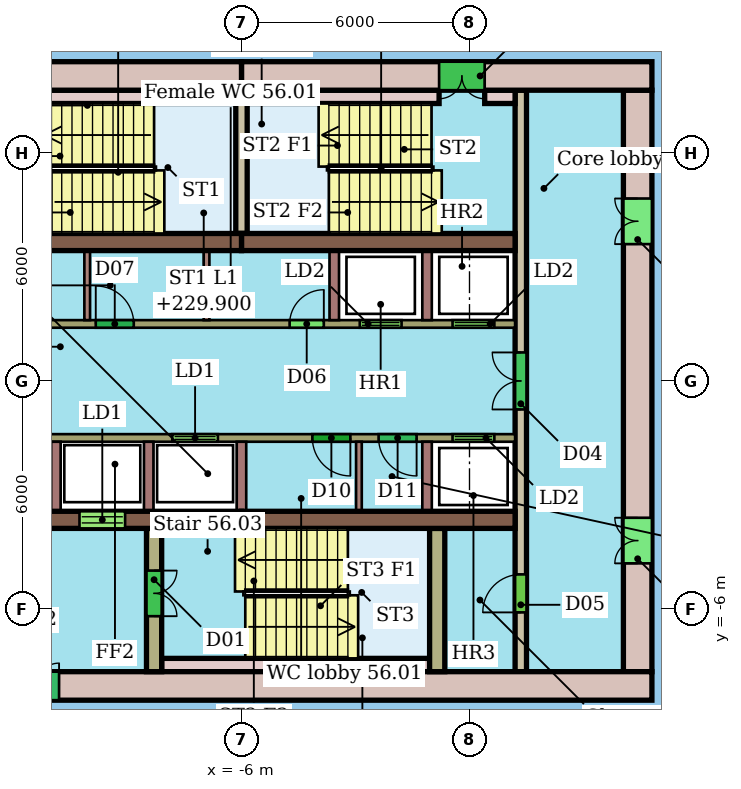
"""IFC4 building model, lengths in metres.
Left out: names, types, materials, properties, quantities, classifications, styles, units other than length and angle.
Written with IfcOpenShell. Run it as: python <this file> out.ifc"""

import sys

from ifc_helpers import new_model, si_unit, direction, frame, frame_2d, origin, place, context, subcontext, project, spatial, rectangle, extrude, element, fill, save


model = new_model("IFC4")
c1 = context("Model", 3, precision=1e-05, world=origin(), true_north=direction((0.0, 1.0)))
c2 = subcontext(c1, "Body", "Model", "MODEL_VIEW")
j1 = project(units=[si_unit("LENGTHUNIT", "METRE"), si_unit("PLANEANGLEUNIT", "RADIAN")], contexts=[c1])
p1 = place(None, origin())
s1 = spatial("IfcSite", under=j1, at=p1, CompositionType="ELEMENT")
p2 = place(p1, origin())
s2 = spatial("IfcBuilding", under=s1, at=p2, CompositionType="ELEMENT")
p3 = place(p2, frame((0.0, 0.0, 228.1)))
s3 = spatial("IfcBuildingStorey", under=s2, at=p3, CompositionType="ELEMENT", Elevation=228.1)
p4 = place(p3, frame((4.8, 8.025, 0.0), z_axis=(0.0, 0.0, 1.0), x_axis=(-1.0, 0.0, 0.0)))
e1 = element("IfcWall", 1, at=p4, inside=s3, PredefinedType="SHEAR", context=c2, shape_type="SweptSolid", body=[
    extrude(rectangle(XDim=10.8, YDim=0.75, at=frame_2d((5.4, 0.0))), origin(), (0.0, 0.0, 1.0), 3.3),
])
p5 = place(p4, frame((4.4, 0.0, 0.0)))
e2 = element("IfcOpeningElement", 2, at=p5, cuts=e1, PredefinedType="OPENING", context=c2, shape_type="SweptSolid", body=[
    extrude(rectangle(XDim=1.2, YDim=2.1, at=frame_2d((0.6, 1.05))), frame((0.0, 0.385, 0.0), z_axis=(0.0, -1.0, 0.0), x_axis=(1.0, 0.0, 0.0)), (0.0, 0.0, 1.0), 0.77),
])
p6 = place(p3, frame((-6.0, 8.025, 0.0), z_axis=(0.0, 0.0, 1.0), x_axis=(-1.0, 0.0, 0.0)))
e3 = element("IfcWall", 3, at=p6, inside=s3, PredefinedType="SHEAR", context=c2, shape_type="SweptSolid", body=[
    extrude(rectangle(XDim=10.8, YDim=0.75, at=frame_2d((5.4, 0.0))), origin(), (0.0, 0.0, 1.0), 3.3),
])
p7 = place(p6, frame((5.2, 0.0, 0.0)))
e4 = element("IfcOpeningElement", 4, at=p7, cuts=e3, PredefinedType="OPENING", context=c2, shape_type="SweptSolid", body=[
    extrude(rectangle(XDim=1.2, YDim=2.1, at=frame_2d((0.6, 1.05))), frame((0.0, 0.385, 0.0), z_axis=(0.0, -1.0, 0.0), x_axis=(1.0, 0.0, 0.0)), (0.0, 0.0, 1.0), 0.77),
])
p8 = place(p3, frame((-16.8, -8.025, 0.0), z_axis=(0.0, 0.0, 1.0), x_axis=(1.0, 0.0, 0.0)))
e5 = element("IfcWall", 5, at=p8, inside=s3, PredefinedType="SHEAR", context=c2, shape_type="SweptSolid", body=[
    extrude(rectangle(XDim=21.6, YDim=0.75, at=frame_2d((10.8, 0.0))), origin(), (0.0, 0.0, 1.0), 3.3),
])
p9 = place(p8, frame((4.8, 0.0, 0.0)))
e6 = element("IfcOpeningElement", 6, at=p9, cuts=e5, PredefinedType="OPENING", context=c2, shape_type="SweptSolid", body=[
    extrude(rectangle(XDim=1.2, YDim=2.1, at=frame_2d((0.6, 1.05))), frame((0.0, 0.385, 0.0), z_axis=(0.0, -1.0, 0.0), x_axis=(1.0, 0.0, 0.0)), (0.0, 0.0, 1.0), 0.77),
])
p10 = place(p3, frame((4.425, -7.65, 0.0), z_axis=(0.0, 0.0, 1.0), x_axis=(0.0, 1.0, 0.0)))
e7 = element("IfcWall", 7, at=p10, inside=s3, PredefinedType="SHEAR", context=c2, shape_type="SweptSolid", body=[
    extrude(rectangle(XDim=15.3, YDim=0.75, at=frame_2d((7.65, 0.0))), origin(), (0.0, 0.0, 1.0), 3.3),
])
p11 = place(p10, frame((2.85, 0.0, 0.0)))
e8 = element("IfcOpeningElement", 8, at=p11, cuts=e7, PredefinedType="OPENING", context=c2, shape_type="SweptSolid", body=[
    extrude(rectangle(XDim=1.2, YDim=2.1, at=frame_2d((0.6, 1.05))), frame((0.0, 0.385, 0.0), z_axis=(0.0, -1.0, 0.0), x_axis=(1.0, 0.0, 0.0)), (0.0, 0.0, 1.0), 0.77),
])
p12 = place(p10, frame((11.25, 0.0, 0.0)))
e9 = element("IfcOpeningElement", 9, at=p12, cuts=e7, PredefinedType="OPENING", context=c2, shape_type="SweptSolid", body=[
    extrude(rectangle(XDim=1.2, YDim=2.1, at=frame_2d((0.6, 1.05))), frame((0.0, 0.385, 0.0), z_axis=(0.0, -1.0, 0.0), x_axis=(1.0, 0.0, 0.0)), (0.0, 0.0, 1.0), 0.77),
])
for number, where, z_axis, x_axis in (
    (10, (-13.2, 3.655, 0.0), (0.0, 0.0, 1.0), (1.0, 0.0, 0.0)),
    (11, (-6.0, 3.655, 0.0), (0.0, 0.0, 1.0), (1.0, 0.0, 0.0)),
):
    element("IfcWall", number, at=place(p3, frame(where, z_axis=z_axis, x_axis=x_axis)), inside=s3, PredefinedType="SHEAR", context=c2, shape_type="SweptSolid", body=[
        extrude(rectangle(XDim=7.2, YDim=0.45, at=frame_2d((3.6, 0.0))), origin(), (0.0, 0.0, 1.0), 3.3),
    ])
p13 = place(p3, frame((-13.2, -3.655, 0.0), z_axis=(0.0, 0.0, 1.0), x_axis=(1.0, 0.0, 0.0)))
e12 = element("IfcWall", 12, at=p13, inside=s3, PredefinedType="SHEAR", context=c2, shape_type="SweptSolid", body=[
    extrude(rectangle(XDim=7.2, YDim=0.45, at=frame_2d((3.6, 0.0))), origin(), (0.0, 0.0, 1.0), 3.3),
])
p14 = place(p13, frame((0.496, 0.0, 0.0)))
e13 = element("IfcOpeningElement", 13, at=p14, cuts=e12, PredefinedType="OPENING", context=c2, shape_type="SweptSolid", body=[
    extrude(rectangle(XDim=1.2, YDim=2.1, at=frame_2d((0.6, 1.05))), frame((0.0, 0.235, 0.0), z_axis=(0.0, -1.0, 0.0), x_axis=(1.0, 0.0, 0.0)), (0.0, 0.0, 1.0), 0.47),
])
p15 = place(p13, frame((2.938, 0.0, 0.0)))
e14 = element("IfcOpeningElement", 14, at=p15, cuts=e12, PredefinedType="OPENING", context=c2, shape_type="SweptSolid", body=[
    extrude(rectangle(XDim=1.2, YDim=2.1, at=frame_2d((0.6, 1.05))), frame((0.0, 0.235, 0.0), z_axis=(0.0, -1.0, 0.0), x_axis=(1.0, 0.0, 0.0)), (0.0, 0.0, 1.0), 0.47),
])
p16 = place(p3, frame((-6.0, -3.655, 0.0), z_axis=(0.0, 0.0, 1.0), x_axis=(1.0, 0.0, 0.0)))
e15 = element("IfcWall", 15, at=p16, inside=s3, PredefinedType="SHEAR", context=c2, shape_type="SweptSolid", body=[
    extrude(rectangle(XDim=7.2, YDim=0.45, at=frame_2d((3.6, 0.0))), origin(), (0.0, 0.0, 1.0), 3.3),
])
p17 = place(p3, frame((1.35, -7.65, 0.0), z_axis=(0.0, 0.0, 1.0), x_axis=(0.0, 1.0, 0.0)))
e16 = element("IfcWall", 16, at=p17, inside=s3, PredefinedType="SHEAR", context=c2, shape_type="SweptSolid", body=[
    extrude(rectangle(XDim=15.3, YDim=0.3, at=frame_2d((7.65, 0.0))), origin(), (0.0, 0.0, 1.0), 3.3),
])
p18 = place(p17, frame((1.56, 0.0, 0.0)))
e17 = element("IfcOpeningElement", 17, at=p18, cuts=e16, PredefinedType="OPENING", context=c2, shape_type="SweptSolid", body=[
    extrude(rectangle(XDim=1.0, YDim=2.1, at=frame_2d((0.5, 1.05))), frame((0.0, 0.16, 0.0), z_axis=(0.0, -1.0, 0.0), x_axis=(1.0, 0.0, 0.0)), (0.0, 0.0, 1.0), 0.32),
])
p19 = place(p17, frame((6.9, 0.0, 0.0)))
e18 = element("IfcOpeningElement", 18, at=p19, cuts=e16, PredefinedType="OPENING", context=c2, shape_type="SweptSolid", body=[
    extrude(rectangle(XDim=1.5, YDim=2.1, at=frame_2d((0.75, 1.05))), frame((0.0, 0.16, 0.0), z_axis=(0.0, -1.0, 0.0), x_axis=(1.0, 0.0, 0.0)), (0.0, 0.0, 1.0), 0.32),
])
p20 = place(p3, frame((-13.2, 1.5, 0.0), z_axis=(0.0, 0.0, 1.0), x_axis=(1.0, 0.0, 0.0)))
e19 = element("IfcWall", 19, at=p20, inside=s3, PredefinedType="SHEAR", context=c2, shape_type="SweptSolid", body=[
    extrude(rectangle(XDim=14.4, YDim=0.2, at=frame_2d((7.2, 0.0))), origin(), (0.0, 0.0, 1.0), 3.3),
])
p21 = place(p20, frame((10.312, 0.0, 0.0)))
e20 = element("IfcOpeningElement", 20, at=p21, cuts=e19, PredefinedType="OPENING", context=c2, shape_type="SweptSolid", body=[
    extrude(rectangle(XDim=1.1, YDim=2.1, at=frame_2d((0.55, 1.05))), frame((0.0, 0.11, 0.0), z_axis=(0.0, -1.0, 0.0), x_axis=(1.0, 0.0, 0.0)), (0.0, 0.0, 1.0), 0.22),
])
p22 = place(p20, frame((12.754, 0.0, 0.0)))
e21 = element("IfcOpeningElement", 21, at=p22, cuts=e19, PredefinedType="OPENING", context=c2, shape_type="SweptSolid", body=[
    extrude(rectangle(XDim=1.1, YDim=2.1, at=frame_2d((0.55, 1.05))), frame((0.0, 0.11, 0.0), z_axis=(0.0, -1.0, 0.0), x_axis=(1.0, 0.0, 0.0)), (0.0, 0.0, 1.0), 0.22),
])
p23 = place(p20, frame((0.15, 0.0, 0.0)))
e22 = element("IfcOpeningElement", 22, at=p23, cuts=e19, PredefinedType="OPENING", context=c2, shape_type="SweptSolid", body=[
    extrude(rectangle(XDim=0.9, YDim=2.1, at=frame_2d((0.45, 1.05))), frame((0.0, 0.11, 0.0), z_axis=(0.0, -1.0, 0.0), x_axis=(1.0, 0.0, 0.0)), (0.0, 0.0, 1.0), 0.22),
])
p24 = place(p20, frame((3.365, 0.0, 0.0)))
e23 = element("IfcOpeningElement", 23, at=p24, cuts=e19, PredefinedType="OPENING", context=c2, shape_type="SweptSolid", body=[
    extrude(rectangle(XDim=1.0, YDim=2.1, at=frame_2d((0.5, 1.05))), frame((0.0, 0.11, 0.0), z_axis=(0.0, -1.0, 0.0), x_axis=(1.0, 0.0, 0.0)), (0.0, 0.0, 1.0), 0.22),
])
p25 = place(p20, frame((8.467, 0.0, 0.0)))
e24 = element("IfcOpeningElement", 24, at=p25, cuts=e19, PredefinedType="OPENING", context=c2, shape_type="SweptSolid", body=[
    extrude(rectangle(XDim=0.9, YDim=2.1, at=frame_2d((0.45, 1.05))), frame((0.0, 0.11, 0.0), z_axis=(0.0, -1.0, 0.0), x_axis=(1.0, 0.0, 0.0)), (0.0, 0.0, 1.0), 0.22),
])
p26 = place(p3, frame((1.2, -1.5, 0.0), z_axis=(0.0, 0.0, 1.0), x_axis=(-1.0, 0.0, 0.0)))
e25 = element("IfcWall", 25, at=p26, inside=s3, PredefinedType="SHEAR", context=c2, shape_type="SweptSolid", body=[
    extrude(rectangle(XDim=14.4, YDim=0.2, at=frame_2d((7.2, 0.0))), origin(), (0.0, 0.0, 1.0), 3.3),
])
p27 = place(p26, frame((7.821, 0.0, 0.0)))
e26 = element("IfcOpeningElement", 26, at=p27, cuts=e25, PredefinedType="OPENING", context=c2, shape_type="SweptSolid", body=[
    extrude(rectangle(XDim=1.2, YDim=2.1, at=frame_2d((0.6, 1.05))), frame((0.0, 0.11, 0.0), z_axis=(0.0, -1.0, 0.0), x_axis=(1.0, 0.0, 0.0)), (0.0, 0.0, 1.0), 0.22),
])
p28 = place(p26, frame((0.546, 0.0, 0.0)))
e27 = element("IfcOpeningElement", 27, at=p28, cuts=e25, PredefinedType="OPENING", context=c2, shape_type="SweptSolid", body=[
    extrude(rectangle(XDim=1.1, YDim=2.1, at=frame_2d((0.55, 1.05))), frame((0.0, 0.11, 0.0), z_axis=(0.0, -1.0, 0.0), x_axis=(1.0, 0.0, 0.0)), (0.0, 0.0, 1.0), 0.22),
])
p29 = place(p26, frame((4.335, 0.0, 0.0)))
e28 = element("IfcOpeningElement", 28, at=p29, cuts=e25, PredefinedType="OPENING", context=c2, shape_type="SweptSolid", body=[
    extrude(rectangle(XDim=1.0, YDim=2.1, at=frame_2d((0.5, 1.05))), frame((0.0, 0.11, 0.0), z_axis=(0.0, -1.0, 0.0), x_axis=(1.0, 0.0, 0.0)), (0.0, 0.0, 1.0), 0.22),
])
p30 = place(p26, frame((2.592, 0.0, 0.0)))
e29 = element("IfcOpeningElement", 29, at=p30, cuts=e25, PredefinedType="OPENING", context=c2, shape_type="SweptSolid", body=[
    extrude(rectangle(XDim=1.0, YDim=2.1, at=frame_2d((0.5, 1.05))), frame((0.0, 0.11, 0.0), z_axis=(0.0, -1.0, 0.0), x_axis=(1.0, 0.0, 0.0)), (0.0, 0.0, 1.0), 0.22),
])
p31 = place(p3, frame((-8.3, -3.88, 0.0), z_axis=(0.0, 0.0, 1.0), x_axis=(0.0, -1.0, 0.0)))
e30 = element("IfcWall", 30, at=p31, inside=s3, PredefinedType="SHEAR", context=c2, shape_type="SweptSolid", body=[
    extrude(rectangle(XDim=3.77, YDim=0.4, at=frame_2d((1.885, 0.0))), origin(), (0.0, 0.0, 1.0), 3.3),
])
p32 = place(p31, frame((1.11, 0.0, 0.0)))
e31 = element("IfcOpeningElement", 31, at=p32, cuts=e30, PredefinedType="OPENING", context=c2, shape_type="SweptSolid", body=[
    extrude(rectangle(XDim=1.2, YDim=2.1, at=frame_2d((0.6, 1.05))), frame((0.0, 0.21, 0.0), z_axis=(0.0, -1.0, 0.0), x_axis=(1.0, 0.0, 0.0)), (0.0, 0.0, 1.0), 0.42),
])
p33 = place(p3, frame((-0.85, -3.88, 0.0), z_axis=(0.0, 0.0, 1.0), x_axis=(0.0, -1.0, 0.0)))
e32 = element("IfcWall", 32, at=p33, inside=s3, PredefinedType="SHEAR", context=c2, shape_type="SweptSolid", body=[
    extrude(rectangle(XDim=3.77, YDim=0.4, at=frame_2d((1.885, 0.0))), origin(), (0.0, 0.0, 1.0), 3.3),
])
p34 = place(p3, frame((-6.0, 3.88, 0.0), z_axis=(0.0, 0.0, 1.0), x_axis=(0.0, 1.0, 0.0)))
e33 = element("IfcWall", 33, at=p34, inside=s3, PredefinedType="SHEAR", context=c2, shape_type="SweptSolid", body=[
    extrude(rectangle(XDim=3.77, YDim=0.3, at=frame_2d((1.885, 0.0))), origin(), (0.0, 0.0, 1.0), 3.3),
])
for number, where, z_axis, x_axis in (
    (34, (-11.2, 7.475, 0.0), (0.0, 0.0, 1.0), (1.0, 0.0, 0.0)),
    (35, (-5.85, 7.475, 0.0), (0.0, 0.0, 1.0), (1.0, 0.0, 0.0)),
):
    element("IfcWall", number, at=place(p3, frame(where, z_axis=z_axis, x_axis=x_axis)), inside=s3, PredefinedType="SHEAR", context=c2, shape_type="SweptSolid", body=[
        extrude(rectangle(XDim=5.05, YDim=0.35, at=frame_2d((2.525, 0.0))), origin(), (0.0, 0.0, 1.0), 3.3),
    ])
p35 = place(p3, frame((0.4, 7.475, 0.0), z_axis=(0.0, 0.0, 1.0), x_axis=(1.0, 0.0, 0.0)))
e36 = element("IfcWall", 36, at=p35, inside=s3, PredefinedType="SHEAR", context=c2, shape_type="SweptSolid", body=[
    extrude(rectangle(XDim=0.8, YDim=0.35, at=frame_2d((0.4, 0.0))), origin(), (0.0, 0.0, 1.0), 3.3),
])
p36 = place(p3, frame((-8.1, -7.475, 0.0), z_axis=(0.0, 0.0, 1.0), x_axis=(1.0, 0.0, 0.0)))
e37 = element("IfcWall", 37, at=p36, inside=s3, PredefinedType="SHEAR", context=c2, shape_type="SweptSolid", body=[
    extrude(rectangle(XDim=7.05, YDim=0.35, at=frame_2d((3.525, 0.0))), origin(), (0.0, 0.0, 1.0), 3.3),
])
for number, where, z_axis, x_axis in (
    (38, (-3.558, 1.6, 0.0), (0.0, 0.0, 1.0), (0.0, 1.0, 0.0)),
    (39, (-1.117, 1.6, 0.0), (0.0, 0.0, 1.0), (0.0, 1.0, 0.0)),
):
    element("IfcWall", number, at=place(p3, frame(where, z_axis=z_axis, x_axis=x_axis)), inside=s3, PredefinedType="SHEAR", context=c2, shape_type="SweptSolid", body=[
        extrude(rectangle(XDim=1.83, YDim=0.25, at=frame_2d((0.915, 0.0))), origin(), (0.0, 0.0, 1.0), 3.3),
    ])
for number, where, z_axis, x_axis in (
    (40, (-10.06, 1.6, 0.0), (0.0, 0.0, 1.0), (0.0, 1.0, 0.0)),
    (41, (-6.919, 1.6, 0.0), (0.0, 0.0, 1.0), (0.0, 1.0, 0.0)),
):
    element("IfcWall", number, at=place(p3, frame(where, z_axis=z_axis, x_axis=x_axis)), inside=s3, PredefinedType="PARTITIONING", context=c2, shape_type="SweptSolid", body=[
        extrude(rectangle(XDim=1.83, YDim=0.15, at=frame_2d((0.915, 0.0))), origin(), (0.0, 0.0, 1.0), 3.3),
    ])
for number, where, z_axis, x_axis in (
    (42, (-10.883, -1.6, 0.0), (0.0, 0.0, 1.0), (0.0, -1.0, 0.0)),
    (43, (-8.442, -1.6, 0.0), (0.0, 0.0, 1.0), (0.0, -1.0, 0.0)),
    (44, (-6.0, -1.6, 0.0), (0.0, 0.0, 1.0), (0.0, -1.0, 0.0)),
    (45, (-1.117, -1.6, 0.0), (0.0, 0.0, 1.0), (0.0, -1.0, 0.0)),
):
    element("IfcWall", number, at=place(p3, frame(where, z_axis=z_axis, x_axis=x_axis)), inside=s3, PredefinedType="SHEAR", context=c2, shape_type="SweptSolid", body=[
        extrude(rectangle(XDim=1.83, YDim=0.25, at=frame_2d((0.915, 0.0))), origin(), (0.0, 0.0, 1.0), 3.3),
    ])
p37 = place(p3, frame((-2.91, -1.6, 0.0), z_axis=(0.0, 0.0, 1.0), x_axis=(0.0, -1.0, 0.0)))
e46 = element("IfcWall", 46, at=p37, inside=s3, PredefinedType="PARTITIONING", context=c2, shape_type="SweptSolid", body=[
    extrude(rectangle(XDim=1.83, YDim=0.15, at=frame_2d((0.915, 0.0))), origin(), (0.0, 0.0, 1.0), 3.3),
])
p38 = place(p5, origin())
e47 = element("IfcDoor", 47, at=p38, inside=s3, OperationType="DOUBLE_DOOR_SINGLE_SWING", PredefinedType="NOTDEFINED", context=c2, shape_type="SweptSolid", body=[
    extrude(rectangle(XDim=1.2, YDim=2.1, at=frame_2d((0.6, 1.05))), frame((0.0, 0.025, 0.0), z_axis=(0.0, -1.0, 0.0), x_axis=(1.0, 0.0, 0.0)), (0.0, 0.0, 1.0), 0.05),
])
fill(e2, e47)
p39 = place(p9, origin())
e48 = element("IfcDoor", 48, at=p39, inside=s3, OperationType="DOUBLE_DOOR_SINGLE_SWING", PredefinedType="NOTDEFINED", context=c2, shape_type="SweptSolid", body=[
    extrude(rectangle(XDim=1.2, YDim=2.1, at=frame_2d((0.6, 1.05))), frame((0.0, 0.025, 0.0), z_axis=(0.0, -1.0, 0.0), x_axis=(1.0, 0.0, 0.0)), (0.0, 0.0, 1.0), 0.05),
])
fill(e6, e48)
p40 = place(p11, origin())
e49 = element("IfcDoor", 49, at=p40, inside=s3, OperationType="DOUBLE_DOOR_SINGLE_SWING", PredefinedType="NOTDEFINED", context=c2, shape_type="SweptSolid", body=[
    extrude(rectangle(XDim=1.2, YDim=2.1, at=frame_2d((0.6, 1.05))), frame((0.0, 0.025, 0.0), z_axis=(0.0, -1.0, 0.0), x_axis=(1.0, 0.0, 0.0)), (0.0, 0.0, 1.0), 0.05),
])
fill(e8, e49)
p41 = place(p12, origin())
e50 = element("IfcDoor", 50, at=p41, inside=s3, OperationType="DOUBLE_DOOR_SINGLE_SWING", PredefinedType="NOTDEFINED", context=c2, shape_type="SweptSolid", body=[
    extrude(rectangle(XDim=1.2, YDim=2.1, at=frame_2d((0.6, 1.05))), frame((0.0, 0.025, 0.0), z_axis=(0.0, -1.0, 0.0), x_axis=(1.0, 0.0, 0.0)), (0.0, 0.0, 1.0), 0.05),
])
fill(e9, e50)
p42 = place(p15, origin())
e51 = element("IfcDoor", 51, at=p42, inside=s3, OperationType="DOUBLE_DOOR_SLIDING", PredefinedType="NOTDEFINED", context=c2, shape_type="SweptSolid", body=[
    extrude(rectangle(XDim=1.2, YDim=2.1, at=frame_2d((0.6, 1.05))), frame((0.0, 0.025, 0.0), z_axis=(0.0, -1.0, 0.0), x_axis=(1.0, 0.0, 0.0)), (0.0, 0.0, 1.0), 0.05),
])
fill(e14, e51)
p43 = place(p18, origin())
e52 = element("IfcDoor", 52, at=p43, inside=s3, OperationType="SINGLE_SWING_LEFT", PredefinedType="NOTDEFINED", context=c2, shape_type="SweptSolid", body=[
    extrude(rectangle(XDim=1.0, YDim=2.1, at=frame_2d((0.5, 1.05))), frame((0.0, 0.025, 0.0), z_axis=(0.0, -1.0, 0.0), x_axis=(1.0, 0.0, 0.0)), (0.0, 0.0, 1.0), 0.05),
])
fill(e17, e52)
p44 = place(p19, origin())
e53 = element("IfcDoor", 53, at=p44, inside=s3, OperationType="DOUBLE_DOOR_SINGLE_SWING", PredefinedType="NOTDEFINED", context=c2, shape_type="SweptSolid", body=[
    extrude(rectangle(XDim=1.5, YDim=2.1, at=frame_2d((0.75, 1.05))), frame((0.0, 0.025, 0.0), z_axis=(0.0, -1.0, 0.0), x_axis=(1.0, 0.0, 0.0)), (0.0, 0.0, 1.0), 0.05),
])
fill(e18, e53)
p45 = place(p21, origin())
e54 = element("IfcDoor", 54, at=p45, inside=s3, OperationType="DOUBLE_DOOR_SLIDING", PredefinedType="NOTDEFINED", context=c2, shape_type="SweptSolid", body=[
    extrude(rectangle(XDim=1.1, YDim=2.1, at=frame_2d((0.55, 1.05))), frame((0.0, 0.025, 0.0), z_axis=(0.0, -1.0, 0.0), x_axis=(1.0, 0.0, 0.0)), (0.0, 0.0, 1.0), 0.05),
])
fill(e20, e54)
p46 = place(p22, origin())
e55 = element("IfcDoor", 55, at=p46, inside=s3, OperationType="DOUBLE_DOOR_SLIDING", PredefinedType="NOTDEFINED", context=c2, shape_type="SweptSolid", body=[
    extrude(rectangle(XDim=1.1, YDim=2.1, at=frame_2d((0.55, 1.05))), frame((0.0, 0.025, 0.0), z_axis=(0.0, -1.0, 0.0), x_axis=(1.0, 0.0, 0.0)), (0.0, 0.0, 1.0), 0.05),
])
fill(e21, e55)
p47 = place(p24, origin())
e56 = element("IfcDoor", 56, at=p47, inside=s3, OperationType="SINGLE_SWING_LEFT", PredefinedType="NOTDEFINED", context=c2, shape_type="SweptSolid", body=[
    extrude(rectangle(XDim=1.0, YDim=2.1, at=frame_2d((0.5, 1.05))), frame((0.0, 0.025, 0.0), z_axis=(0.0, -1.0, 0.0), x_axis=(1.0, 0.0, 0.0)), (0.0, 0.0, 1.0), 0.05),
])
fill(e23, e56)
p48 = place(p25, origin())
e57 = element("IfcDoor", 57, at=p48, inside=s3, OperationType="SINGLE_SWING_RIGHT", PredefinedType="NOTDEFINED", context=c2, shape_type="SweptSolid", body=[
    extrude(rectangle(XDim=0.9, YDim=2.1, at=frame_2d((0.45, 1.05))), frame((0.0, 0.025, 0.0), z_axis=(0.0, -1.0, 0.0), x_axis=(1.0, 0.0, 0.0)), (0.0, 0.0, 1.0), 0.05),
])
fill(e24, e57)
p49 = place(p27, origin())
e58 = element("IfcDoor", 58, at=p49, inside=s3, OperationType="DOUBLE_DOOR_SLIDING", PredefinedType="NOTDEFINED", context=c2, shape_type="SweptSolid", body=[
    extrude(rectangle(XDim=1.2, YDim=2.1, at=frame_2d((0.6, 1.05))), frame((0.0, 0.025, 0.0), z_axis=(0.0, -1.0, 0.0), x_axis=(1.0, 0.0, 0.0)), (0.0, 0.0, 1.0), 0.05),
])
fill(e26, e58)
p50 = place(p28, origin())
e59 = element("IfcDoor", 59, at=p50, inside=s3, OperationType="DOUBLE_DOOR_SLIDING", PredefinedType="NOTDEFINED", context=c2, shape_type="SweptSolid", body=[
    extrude(rectangle(XDim=1.1, YDim=2.1, at=frame_2d((0.55, 1.05))), frame((0.0, 0.025, 0.0), z_axis=(0.0, -1.0, 0.0), x_axis=(1.0, 0.0, 0.0)), (0.0, 0.0, 1.0), 0.05),
])
fill(e27, e59)
p51 = place(p29, origin())
e60 = element("IfcDoor", 60, at=p51, inside=s3, OperationType="SINGLE_SWING_LEFT", PredefinedType="NOTDEFINED", context=c2, shape_type="SweptSolid", body=[
    extrude(rectangle(XDim=1.0, YDim=2.1, at=frame_2d((0.5, 1.05))), frame((0.0, 0.025, 0.0), z_axis=(0.0, -1.0, 0.0), x_axis=(1.0, 0.0, 0.0)), (0.0, 0.0, 1.0), 0.05),
])
fill(e28, e60)
p52 = place(p30, origin())
e61 = element("IfcDoor", 61, at=p52, inside=s3, OperationType="SINGLE_SWING_LEFT", PredefinedType="NOTDEFINED", context=c2, shape_type="SweptSolid", body=[
    extrude(rectangle(XDim=1.0, YDim=2.1, at=frame_2d((0.5, 1.05))), frame((0.0, 0.025, 0.0), z_axis=(0.0, -1.0, 0.0), x_axis=(1.0, 0.0, 0.0)), (0.0, 0.0, 1.0), 0.05),
])
fill(e29, e61)
p53 = place(p32, origin())
e62 = element("IfcDoor", 62, at=p53, inside=s3, OperationType="DOUBLE_DOOR_SINGLE_SWING", PredefinedType="NOTDEFINED", context=c2, shape_type="SweptSolid", body=[
    extrude(rectangle(XDim=1.2, YDim=2.1, at=frame_2d((0.6, 1.05))), frame((0.0, 0.025, 0.0), z_axis=(0.0, -1.0, 0.0), x_axis=(1.0, 0.0, 0.0)), (0.0, 0.0, 1.0), 0.05),
])
fill(e31, e62)
save(model, sys.argv[1])
